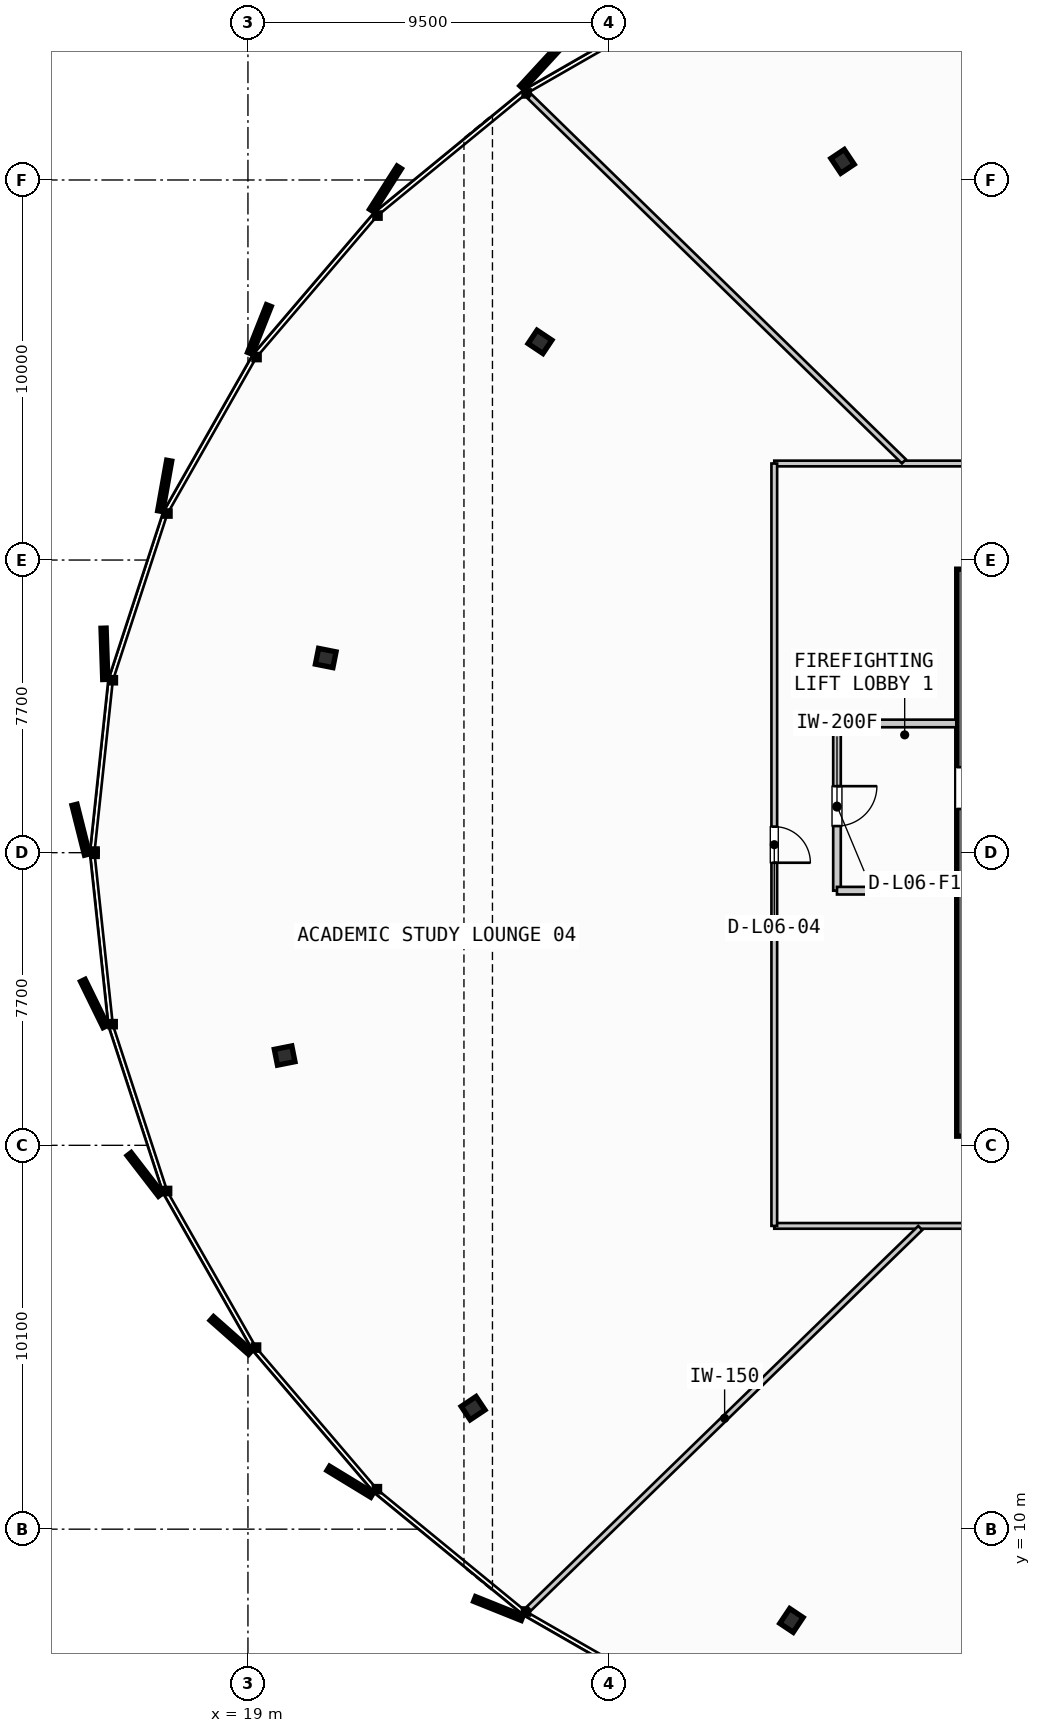
"""IFC4 building model, lengths in metres.
Left out: names, types, materials, properties, quantities, classifications, styles, units other than length and angle.
Written with IfcOpenShell. Run it as: python <this file> out.ifc"""

import sys

from ifc_helpers import new_model, si_unit, direction, frame, frame_2d, origin, origin_2d, place, context, subcontext, project, spatial, rectangle, i_section, extrude, source, transform, mapped, element, fill, save


model = new_model("IFC4")
c1 = context("Model", 3, precision=1e-05, world=origin(), true_north=direction((0.0, 1.0)))
c2 = subcontext(c1, "Body", "Model", "MODEL_VIEW")
j1 = project(units=[si_unit("LENGTHUNIT", "METRE"), si_unit("PLANEANGLEUNIT", "RADIAN")], contexts=[c1])
p1 = place(None, origin())
s1 = spatial("IfcSite", under=j1, at=p1, CompositionType="ELEMENT")
p2 = place(p1, origin())
s2 = spatial("IfcBuilding", under=s1, at=p2, CompositionType="ELEMENT")
p3 = place(p2, frame((0.0, 0.0, 29.6)))
s3 = spatial("IfcBuildingStorey", under=s2, at=p3, CompositionType="ELEMENT", Elevation=29.6)
p4 = place(p3, frame((38.0, 35.26, 0.0), z_axis=(0.0, 0.0, 1.0), x_axis=(0.0, -1.0, 0.0)))
e1 = element("IfcWall", 1, at=p4, inside=s3, PredefinedType="SHEAR", context=c2, shape_type="SweptSolid", body=[
    extrude(rectangle(XDim=14.92, YDim=0.7, at=frame_2d((7.46, 0.0))), origin(), (0.0, 0.0, 1.0), 3.55),
])
p5 = place(p4, frame((5.21, 0.0, 0.0)))
e2 = element("IfcOpeningElement", 2, at=p5, cuts=e1, PredefinedType="OPENING", context=c2, shape_type="SweptSolid", body=[
    extrude(rectangle(XDim=1.1, YDim=2.2, at=frame_2d((0.55, 1.1))), frame((0.0, 0.36, 0.0), z_axis=(0.0, -1.0, 0.0), x_axis=(1.0, 0.0, 0.0)), (0.0, 0.0, 1.0), 0.72),
])
m1 = source(origin(), c2, "Body", "SweptSolid", [
    extrude(i_section(OverallWidth=0.423, OverallDepth=0.469, WebThickness=0.051, FlangeThickness=0.081, FilletRadius=0.015, at=origin_2d()), origin(), (0.0, 0.0, 1.0), 3.55),
])
for number, where, z_axis, x_axis in (
    (3, (34.646, 45.99, 0.0), (0.0, 0.0, 1.0), (-0.556, 0.831, 0.0)),
    (4, (26.685, 41.241, 0.0), (0.0, 0.0, 1.0), (-0.831, 0.556, 0.0)),
    (5, (21.047, 32.923, 0.0), (0.0, 0.0, 1.0), (-0.981, 0.195, 0.0)),
    (6, (19.966, 22.462, 0.0), (0.0, 0.0, 1.0), (-0.981, -0.195, 0.0)),
    (7, (24.925, 13.183, 0.0), (0.0, 0.0, 1.0), (-0.831, -0.556, 0.0)),
    (8, (33.302, 7.599, 0.0), (0.0, 0.0, 1.0), (-0.556, -0.831, 0.0)),
):
    element("IfcColumn", number, at=place(p3, frame(where, z_axis=z_axis, x_axis=x_axis)), inside=s3, PredefinedType="COLUMN", context=c2, shape_type="MappedRepresentation", body=[
        mapped(m1, transform((0.0, 0.0, 0.0), scale=1.0)),
    ])
p6 = place(p3, frame((34.5, 31.2, 0.0), z_axis=(0.0, 0.0, 1.0), x_axis=(0.0, -1.0, 0.0)))
e9 = element("IfcWall", 9, at=p6, inside=s3, PredefinedType="PARTITIONING", context=c2, shape_type="SweptSolid", body=[
    extrude(rectangle(XDim=4.4, YDim=0.2, at=frame_2d((2.2, 0.0))), origin(), (0.0, 0.0, 1.0), 2.925),
])
p7 = place(p6, frame((1.65, 0.0, 0.0)))
e10 = element("IfcOpeningElement", 10, at=p7, cuts=e9, PredefinedType="OPENING", context=c2, shape_type="SweptSolid", body=[
    extrude(rectangle(XDim=1.05, YDim=2.15, at=frame_2d((0.525, 1.075))), frame((0.0, 0.11, 0.0), z_axis=(0.0, -1.0, 0.0), x_axis=(1.0, 0.0, 0.0)), (0.0, 0.0, 1.0), 0.22),
])
for number, where, z_axis, x_axis in (
    (11, (34.5, 26.8, 0.0), (0.0, 0.0, 1.0), (1.0, 0.0, 0.0)),
    (12, (34.5, 31.2, 0.0), (0.0, 0.0, 1.0), (1.0, 0.0, 0.0)),
):
    element("IfcWall", number, at=place(p3, frame(where, z_axis=z_axis, x_axis=x_axis)), inside=s3, PredefinedType="PARTITIONING", context=c2, shape_type="SweptSolid", body=[
        extrude(rectangle(XDim=3.14, YDim=0.2, at=frame_2d((1.57, 0.0))), origin(), (0.0, 0.0, 1.0), 2.925),
    ])
p8 = place(p3, frame((32.85, 17.98, 0.0), z_axis=(0.0, 0.0, 1.0), x_axis=(1.0, 0.0, 0.0)))
e13 = element("IfcWall", 13, at=p8, inside=s3, PredefinedType="PARTITIONING", context=c2, shape_type="SweptSolid", body=[
    extrude(rectangle(XDim=28.42, YDim=0.15, at=frame_2d((14.21, 0.0))), origin(), (0.0, 0.0, 1.0), 2.925),
])
p9 = place(p8, frame((15.334, 0.0, 0.0)))
e14 = element("IfcOpeningElement", 14, at=p9, cuts=e13, PredefinedType="OPENING", context=c2, shape_type="SweptSolid", body=[
    extrude(rectangle(XDim=0.95, YDim=2.15, at=frame_2d((0.475, 1.075))), frame((0.0, 0.085, 0.0), z_axis=(0.0, -1.0, 0.0), x_axis=(1.0, 0.0, 0.0)), (0.0, 0.0, 1.0), 0.17),
])
p10 = place(p3, frame((61.27, 38.04, 0.0), z_axis=(0.0, 0.0, 1.0), x_axis=(-1.0, 0.0, 0.0)))
e15 = element("IfcWall", 15, at=p10, inside=s3, PredefinedType="PARTITIONING", context=c2, shape_type="SweptSolid", body=[
    extrude(rectangle(XDim=28.42, YDim=0.15, at=frame_2d((14.21, 0.0))), origin(), (0.0, 0.0, 1.0), 2.925),
])
p11 = place(p10, frame((13.995, 0.0, 0.0)))
e16 = element("IfcOpeningElement", 16, at=p11, cuts=e15, PredefinedType="OPENING", context=c2, shape_type="SweptSolid", body=[
    extrude(rectangle(XDim=0.95, YDim=2.15, at=frame_2d((0.475, 1.075))), frame((0.0, 0.085, 0.0), z_axis=(0.0, -1.0, 0.0), x_axis=(1.0, 0.0, 0.0)), (0.0, 0.0, 1.0), 0.17),
])
p12 = place(p3, frame((32.85, 38.04, 0.0), z_axis=(0.0, 0.0, 1.0), x_axis=(0.0, -1.0, 0.0)))
e17 = element("IfcWall", 17, at=p12, inside=s3, PredefinedType="PARTITIONING", context=c2, shape_type="SweptSolid", body=[
    extrude(rectangle(XDim=20.06, YDim=0.15, at=frame_2d((10.03, 0.0))), origin(), (0.0, 0.0, 1.0), 2.925),
])
p13 = place(p12, frame((9.555, 0.0, 0.0)))
e18 = element("IfcOpeningElement", 18, at=p13, cuts=e17, PredefinedType="OPENING", context=c2, shape_type="SweptSolid", body=[
    extrude(rectangle(XDim=0.95, YDim=2.15, at=frame_2d((0.475, 1.075))), frame((0.0, 0.085, 0.0), z_axis=(0.0, -1.0, 0.0), x_axis=(1.0, 0.0, 0.0)), (0.0, 0.0, 1.0), 0.17),
])
p14 = place(p3, frame((36.691, 17.924, 0.0), z_axis=(0.0, 0.0, 1.0), x_axis=(-0.716863458564, -0.697213584044, 0.0)))
e19 = element("IfcWall", 19, at=p14, inside=s3, PredefinedType="PARTITIONING", context=c2, shape_type="SweptSolid", body=[
    extrude(rectangle(XDim=14.363, YDim=0.15, at=frame_2d((7.181, 0.0))), origin(), (0.0, 0.0, 1.0), 2.925),
])
p15 = place(p3, frame((36.261, 38.096, 0.0), z_axis=(0.0, 0.0, 1.0), x_axis=(-0.715959114094, 0.698142211119, 0.0)))
e20 = element("IfcWall", 20, at=p15, inside=s3, PredefinedType="PARTITIONING", context=c2, shape_type="SweptSolid", body=[
    extrude(rectangle(XDim=13.758, YDim=0.15, at=frame_2d((6.879, 0.0))), origin(), (0.0, 0.0, 1.0), 2.925),
])
m2 = source(origin(), c2, "Body", "SweptSolid", [
    extrude(rectangle(XDim=1.05, YDim=2.15, at=frame_2d((0.525, 1.075))), frame((0.0, 0.025, 0.0), z_axis=(0.0, -1.0, 0.0), x_axis=(1.0, 0.0, 0.0)), (0.0, 0.0, 1.0), 0.05),
])
p16 = place(p7, origin())
e21 = element("IfcDoor", 21, at=p16, inside=s3, OperationType="SINGLE_SWING_LEFT", PredefinedType="DOOR", context=c2, shape_type="MappedRepresentation", body=[
    mapped(m2, transform((0.0, 0.0, 0.0), scale=1.0)),
])
fill(e10, e21)
m3 = source(origin(), c2, "Body", "SweptSolid", [
    extrude(rectangle(XDim=0.95, YDim=2.15, at=frame_2d((0.475, 1.075))), frame((0.0, 0.025, 0.0), z_axis=(0.0, -1.0, 0.0), x_axis=(1.0, 0.0, 0.0)), (0.0, 0.0, 1.0), 0.05),
])
p17 = place(p13, origin())
e22 = element("IfcDoor", 22, at=p17, inside=s3, OperationType="SINGLE_SWING_RIGHT", PredefinedType="DOOR", context=c2, shape_type="MappedRepresentation", body=[
    mapped(m3, transform((0.0, 0.0, 0.0), scale=1.0)),
])
fill(e18, e22)
save(model, sys.argv[1])
